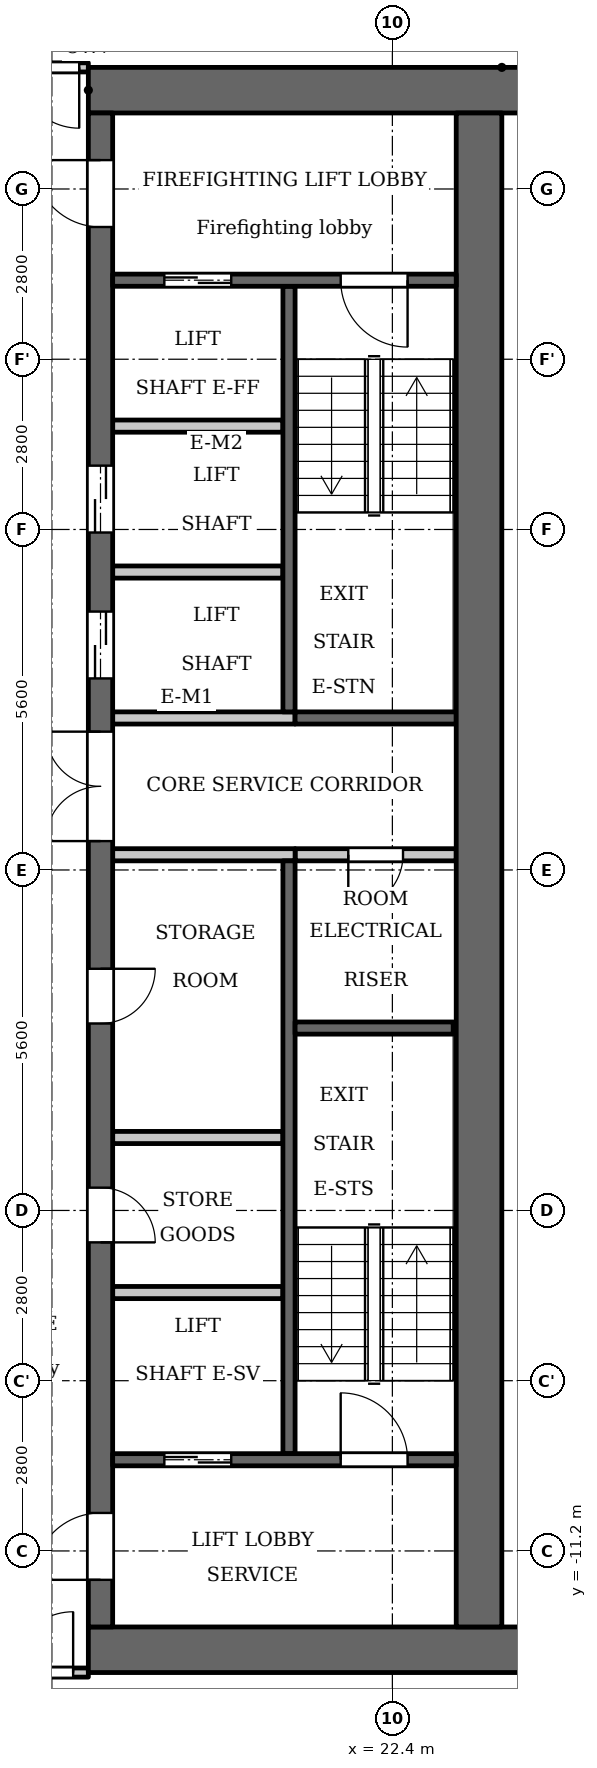
"""IFC4 building model, lengths in metres.
Left out: names, types, materials, properties, quantities, classifications, styles, units other than length and angle.
Written with IfcOpenShell. Run it as: python <this file> out.ifc"""

import sys

from ifc_helpers import new_model, si_unit, direction, frame, frame_2d, origin, place, context, subcontext, project, spatial, rectangle, extrude, element, fill, save


model = new_model("IFC4")
c1 = context("Model", 3, precision=1e-05, world=origin(), true_north=direction((0.0, 1.0)))
c2 = subcontext(c1, "Body", "Model", "MODEL_VIEW")
j1 = project(units=[si_unit("LENGTHUNIT", "METRE"), si_unit("PLANEANGLEUNIT", "RADIAN")], contexts=[c1])
p1 = place(None, origin())
s1 = spatial("IfcSite", under=j1, at=p1, CompositionType="ELEMENT")
p2 = place(p1, origin())
s2 = spatial("IfcBuilding", under=s1, at=p2, CompositionType="ELEMENT")
p3 = place(p2, frame((0.0, 0.0, 192.4)))
s3 = spatial("IfcBuildingStorey", under=s2, at=p3, CompositionType="ELEMENT", Elevation=192.4)
p4 = place(p3, frame((20.7, 2.6, 0.0), z_axis=(0.0, 0.0, 1.0), x_axis=(0.0, 1.0, 0.0)))
e1 = element("IfcWall", 1, at=p4, inside=s3, PredefinedType="SHEAR", context=c2, shape_type="SweptSolid", body=[
    extrude(rectangle(XDim=7.0, YDim=0.2, at=frame_2d((3.5, 0.0))), origin(), (0.0, 0.0, 1.0), 3.2),
])
p5 = place(p3, frame((20.7, -9.6, 0.0), z_axis=(0.0, 0.0, 1.0), x_axis=(0.0, 1.0, 0.0)))
e2 = element("IfcWall", 2, at=p5, inside=s3, PredefinedType="SHEAR", context=c2, shape_type="SweptSolid", body=[
    extrude(rectangle(XDim=9.75, YDim=0.2, at=frame_2d((4.875, 0.0))), origin(), (0.0, 0.0, 1.0), 3.2),
])
p6 = place(p3, frame((20.8, 2.5, 0.0), z_axis=(0.0, 0.0, 1.0), x_axis=(1.0, 0.0, 0.0)))
e3 = element("IfcWall", 3, at=p6, inside=s3, PredefinedType="SHEAR", context=c2, shape_type="SweptSolid", body=[
    extrude(rectangle(XDim=2.65, YDim=0.2, at=frame_2d((1.325, 0.0))), origin(), (0.0, 0.0, 1.0), 3.2),
])
p7 = place(p3, frame((20.8, 0.25, 0.0), z_axis=(0.0, 0.0, 1.0), x_axis=(1.0, 0.0, 0.0)))
e4 = element("IfcWall", 4, at=p7, inside=s3, PredefinedType="PARTITIONING", context=c2, shape_type="SweptSolid", body=[
    extrude(rectangle(XDim=2.65, YDim=0.2, at=frame_2d((1.325, 0.0))), origin(), (0.0, 0.0, 1.0), 3.2),
])
p8 = place(p7, frame((0.875, 0.0, 0.0)))
e5 = element("IfcOpeningElement", 5, at=p8, cuts=e4, PredefinedType="OPENING", context=c2, shape_type="SweptSolid", body=[
    extrude(rectangle(XDim=0.9, YDim=2.1, at=frame_2d((0.45, 1.05))), frame((0.0, 0.11, 0.0), z_axis=(0.0, -1.0, 0.0), x_axis=(1.0, 0.0, 0.0)), (0.0, 0.0, 1.0), 0.22),
])
for number, where, z_axis, x_axis in (
    (6, (17.4, 12.825, 0.0), (0.0, 0.0, 1.0), (1.0, 0.0, 0.0)),
    (7, (17.4, -12.825, 0.0), (0.0, 0.0, 1.0), (1.0, 0.0, 0.0)),
):
    element("IfcWall", number, at=place(p3, frame(where, z_axis=z_axis, x_axis=x_axis)), inside=s3, PredefinedType="SHEAR", context=c2, shape_type="SweptSolid", body=[
        extrude(rectangle(XDim=7.6, YDim=0.75, at=frame_2d((3.8, 0.0))), origin(), (0.0, 0.0, 1.0), 3.2),
    ])
p9 = place(p3, frame((17.8, -4.4, 0.0), z_axis=(0.0, 0.0, 1.0), x_axis=(1.0, 0.0, 0.0)))
e8 = element("IfcWall", 8, at=p9, inside=s3, PredefinedType="PARTITIONING", context=c2, shape_type="SweptSolid", body=[
    extrude(rectangle(XDim=2.8, YDim=0.2, at=frame_2d((1.4, 0.0))), origin(), (0.0, 0.0, 1.0), 3.2),
])
p10 = place(p3, frame((17.6, -12.45, 0.0), z_axis=(0.0, 0.0, 1.0), x_axis=(0.0, 1.0, 0.0)))
e9 = element("IfcWall", 9, at=p10, inside=s3, PredefinedType="SHEAR", context=c2, shape_type="SweptSolid", body=[
    extrude(rectangle(XDim=24.9, YDim=0.4, at=frame_2d((12.45, 0.0))), origin(), (0.0, 0.0, 1.0), 3.2),
])
p11 = place(p10, frame((6.325, 0.0, 0.0)))
e10 = element("IfcOpeningElement", 10, at=p11, cuts=e9, PredefinedType="OPENING", context=c2, shape_type="SweptSolid", body=[
    extrude(rectangle(XDim=0.9, YDim=2.1, at=frame_2d((0.45, 1.05))), frame((0.0, 0.21, 0.0), z_axis=(0.0, -1.0, 0.0), x_axis=(1.0, 0.0, 0.0)), (0.0, 0.0, 1.0), 0.42),
])
p12 = place(p10, frame((9.925, 0.0, 0.0)))
e11 = element("IfcOpeningElement", 11, at=p12, cuts=e9, PredefinedType="OPENING", context=c2, shape_type="SweptSolid", body=[
    extrude(rectangle(XDim=0.9, YDim=2.1, at=frame_2d((0.45, 1.05))), frame((0.0, 0.21, 0.0), z_axis=(0.0, -1.0, 0.0), x_axis=(1.0, 0.0, 0.0)), (0.0, 0.0, 1.0), 0.42),
])
p13 = place(p10, frame((15.6, 0.0, 0.0)))
e12 = element("IfcOpeningElement", 12, at=p13, cuts=e9, PredefinedType="OPENING", context=c2, shape_type="SweptSolid", body=[
    extrude(rectangle(XDim=1.1, YDim=2.1, at=frame_2d((0.55, 1.05))), frame((0.0, 0.21, 0.0), z_axis=(0.0, -1.0, 0.0), x_axis=(1.0, 0.0, 0.0)), (0.0, 0.0, 1.0), 0.42),
])
p14 = place(p10, frame((18.0, 0.0, 0.0)))
e13 = element("IfcOpeningElement", 13, at=p14, cuts=e9, PredefinedType="OPENING", context=c2, shape_type="SweptSolid", body=[
    extrude(rectangle(XDim=1.1, YDim=2.1, at=frame_2d((0.55, 1.05))), frame((0.0, 0.21, 0.0), z_axis=(0.0, -1.0, 0.0), x_axis=(1.0, 0.0, 0.0)), (0.0, 0.0, 1.0), 0.42),
])
p15 = place(p10, frame((23.025, 0.0, 0.0)))
e14 = element("IfcOpeningElement", 14, at=p15, cuts=e9, PredefinedType="OPENING", context=c2, shape_type="SweptSolid", body=[
    extrude(rectangle(XDim=1.1, YDim=2.1, at=frame_2d((0.55, 1.05))), frame((0.0, 0.21, 0.0), z_axis=(0.0, -1.0, 0.0), x_axis=(1.0, 0.0, 0.0)), (0.0, 0.0, 1.0), 0.42),
])
p16 = place(p10, frame((0.775, 0.0, 0.0)))
e15 = element("IfcOpeningElement", 15, at=p16, cuts=e9, PredefinedType="OPENING", context=c2, shape_type="SweptSolid", body=[
    extrude(rectangle(XDim=1.1, YDim=2.1, at=frame_2d((0.55, 1.05))), frame((0.0, 0.21, 0.0), z_axis=(0.0, -1.0, 0.0), x_axis=(1.0, 0.0, 0.0)), (0.0, 0.0, 1.0), 0.42),
])
p17 = place(p10, frame((12.925, 0.0, 0.0)))
e16 = element("IfcOpeningElement", 16, at=p17, cuts=e9, PredefinedType="OPENING", context=c2, shape_type="SweptSolid", body=[
    extrude(rectangle(XDim=1.8, YDim=2.1, at=frame_2d((0.9, 1.05))), frame((0.0, 0.21, 0.0), z_axis=(0.0, -1.0, 0.0), x_axis=(1.0, 0.0, 0.0)), (0.0, 0.0, 1.0), 0.42),
])
p18 = place(p3, frame((23.825, -12.45, 0.0), z_axis=(0.0, 0.0, 1.0), x_axis=(0.0, 1.0, 0.0)))
e17 = element("IfcWall", 17, at=p18, inside=s3, PredefinedType="SHEAR", context=c2, shape_type="SweptSolid", body=[
    extrude(rectangle(XDim=24.9, YDim=0.75, at=frame_2d((12.45, 0.0))), origin(), (0.0, 0.0, 1.0), 3.2),
])
p19 = place(p3, frame((17.8, -9.7, 0.0), z_axis=(0.0, 0.0, 1.0), x_axis=(1.0, 0.0, 0.0)))
e18 = element("IfcWall", 18, at=p19, inside=s3, PredefinedType="SHEAR", context=c2, shape_type="SweptSolid", body=[
    extrude(rectangle(XDim=5.65, YDim=0.2, at=frame_2d((2.825, 0.0))), origin(), (0.0, 0.0, 1.0), 3.2),
])
p20 = place(p19, frame((0.85, 0.0, 0.0)))
e19 = element("IfcOpeningElement", 19, at=p20, cuts=e18, PredefinedType="OPENING", context=c2, shape_type="SweptSolid", body=[
    extrude(rectangle(XDim=1.1, YDim=2.1, at=frame_2d((0.55, 1.05))), frame((0.0, 0.11, 0.0), z_axis=(0.0, -1.0, 0.0), x_axis=(1.0, 0.0, 0.0)), (0.0, 0.0, 1.0), 0.22),
])
p21 = place(p19, frame((3.75, 0.0, 0.0)))
e20 = element("IfcOpeningElement", 20, at=p21, cuts=e18, PredefinedType="OPENING", context=c2, shape_type="SweptSolid", body=[
    extrude(rectangle(XDim=1.1, YDim=2.1, at=frame_2d((0.55, 1.05))), frame((0.0, 0.11, 0.0), z_axis=(0.0, -1.0, 0.0), x_axis=(1.0, 0.0, 0.0)), (0.0, 0.0, 1.0), 0.22),
])
p22 = place(p3, frame((17.8, -6.95, 0.0), z_axis=(0.0, 0.0, 1.0), x_axis=(1.0, 0.0, 0.0)))
e21 = element("IfcWall", 21, at=p22, inside=s3, PredefinedType="PARTITIONING", context=c2, shape_type="SweptSolid", body=[
    extrude(rectangle(XDim=2.8, YDim=0.2, at=frame_2d((1.4, 0.0))), origin(), (0.0, 0.0, 1.0), 3.2),
])
for number, where, z_axis, x_axis in (
    (22, (17.8, 0.25, 0.0), (0.0, 0.0, 1.0), (1.0, 0.0, 0.0)),
    (23, (17.8, 2.5, 0.0), (0.0, 0.0, 1.0), (1.0, 0.0, 0.0)),
):
    element("IfcWall", number, at=place(p3, frame(where, z_axis=z_axis, x_axis=x_axis)), inside=s3, PredefinedType="PARTITIONING", context=c2, shape_type="SweptSolid", body=[
        extrude(rectangle(XDim=3.0, YDim=0.2, at=frame_2d((1.5, 0.0))), origin(), (0.0, 0.0, 1.0), 3.2),
    ])
for number, where, z_axis, x_axis in (
    (24, (17.8, 4.9, 0.0), (0.0, 0.0, 1.0), (1.0, 0.0, 0.0)),
    (25, (17.8, 7.3, 0.0), (0.0, 0.0, 1.0), (1.0, 0.0, 0.0)),
):
    element("IfcWall", number, at=place(p3, frame(where, z_axis=z_axis, x_axis=x_axis)), inside=s3, PredefinedType="PARTITIONING", context=c2, shape_type="SweptSolid", body=[
        extrude(rectangle(XDim=2.8, YDim=0.2, at=frame_2d((1.4, 0.0))), origin(), (0.0, 0.0, 1.0), 3.2),
    ])
p23 = place(p3, frame((17.8, 9.7, 0.0), z_axis=(0.0, 0.0, 1.0), x_axis=(1.0, 0.0, 0.0)))
e26 = element("IfcWall", 26, at=p23, inside=s3, PredefinedType="SHEAR", context=c2, shape_type="SweptSolid", body=[
    extrude(rectangle(XDim=5.65, YDim=0.2, at=frame_2d((2.825, 0.0))), origin(), (0.0, 0.0, 1.0), 3.2),
])
p24 = place(p23, frame((0.85, 0.0, 0.0)))
e27 = element("IfcOpeningElement", 27, at=p24, cuts=e26, PredefinedType="OPENING", context=c2, shape_type="SweptSolid", body=[
    extrude(rectangle(XDim=1.1, YDim=2.1, at=frame_2d((0.55, 1.05))), frame((0.0, 0.11, 0.0), z_axis=(0.0, -1.0, 0.0), x_axis=(1.0, 0.0, 0.0)), (0.0, 0.0, 1.0), 0.22),
])
p25 = place(p23, frame((3.75, 0.0, 0.0)))
e28 = element("IfcOpeningElement", 28, at=p25, cuts=e26, PredefinedType="OPENING", context=c2, shape_type="SweptSolid", body=[
    extrude(rectangle(XDim=1.1, YDim=2.1, at=frame_2d((0.55, 1.05))), frame((0.0, 0.11, 0.0), z_axis=(0.0, -1.0, 0.0), x_axis=(1.0, 0.0, 0.0)), (0.0, 0.0, 1.0), 0.22),
])
p26 = place(p3, frame((20.8, -2.6, 0.0), z_axis=(0.0, 0.0, 1.0), x_axis=(1.0, 0.0, 0.0)))
e29 = element("IfcWall", 29, at=p26, inside=s3, PredefinedType="SHEAR", context=c2, shape_type="SweptSolid", body=[
    extrude(rectangle(XDim=2.6, YDim=0.2, at=frame_2d((1.3, 0.0))), origin(), (0.0, 0.0, 1.0), 3.2),
])
p27 = place(p3, frame((-17.4, -13.2, 0.0), z_axis=(0.0, 0.0, 1.0), x_axis=(1.0, 0.0, 0.0)))
e30 = element("IfcWall", 30, at=p27, inside=s3, PredefinedType="PARTITIONING", context=c2, shape_type="SweptSolid", body=[
    extrude(rectangle(XDim=34.8, YDim=0.15, at=frame_2d((17.4, 0.0))), origin(), (0.0, 0.0, 1.0), 3.2),
])
p28 = place(p27, frame((0.15, 0.0, 0.0)))
e31 = element("IfcOpeningElement", 31, at=p28, cuts=e30, PredefinedType="OPENING", context=c2, shape_type="SweptSolid", body=[
    extrude(rectangle(XDim=1.0, YDim=2.1, at=frame_2d((0.5, 1.05))), frame((0.0, 0.085, 0.0), z_axis=(0.0, -1.0, 0.0), x_axis=(1.0, 0.0, 0.0)), (0.0, 0.0, 1.0), 0.17),
])
p29 = place(p27, frame((33.55, 0.0, 0.0)))
e32 = element("IfcOpeningElement", 32, at=p29, cuts=e30, PredefinedType="OPENING", context=c2, shape_type="SweptSolid", body=[
    extrude(rectangle(XDim=1.0, YDim=2.1, at=frame_2d((0.5, 1.05))), frame((0.0, 0.085, 0.0), z_axis=(0.0, -1.0, 0.0), x_axis=(1.0, 0.0, 0.0)), (0.0, 0.0, 1.0), 0.17),
])
p30 = place(p27, frame((15.7, 0.0, 0.0)))
e33 = element("IfcOpeningElement", 33, at=p30, cuts=e30, PredefinedType="OPENING", context=c2, shape_type="SweptSolid", body=[
    extrude(rectangle(XDim=1.0, YDim=2.1, at=frame_2d((0.5, 1.05))), frame((0.0, 0.085, 0.0), z_axis=(0.0, -1.0, 0.0), x_axis=(1.0, 0.0, 0.0)), (0.0, 0.0, 1.0), 0.17),
])
p31 = place(p27, frame((26.9, 0.0, 0.0)))
e34 = element("IfcOpeningElement", 34, at=p31, cuts=e30, PredefinedType="OPENING", context=c2, shape_type="SweptSolid", body=[
    extrude(rectangle(XDim=1.0, YDim=2.1, at=frame_2d((0.5, 1.05))), frame((0.0, 0.085, 0.0), z_axis=(0.0, -1.0, 0.0), x_axis=(1.0, 0.0, 0.0)), (0.0, 0.0, 1.0), 0.17),
])
p32 = place(p3, frame((-17.4, 13.2, 0.0), z_axis=(0.0, 0.0, 1.0), x_axis=(1.0, 0.0, 0.0)))
e35 = element("IfcWall", 35, at=p32, inside=s3, PredefinedType="PARTITIONING", context=c2, shape_type="SweptSolid", body=[
    extrude(rectangle(XDim=34.8, YDim=0.15, at=frame_2d((17.4, 0.0))), origin(), (0.0, 0.0, 1.0), 3.2),
])
p33 = place(p32, frame((0.25, 0.0, 0.0)))
e36 = element("IfcOpeningElement", 36, at=p33, cuts=e35, PredefinedType="OPENING", context=c2, shape_type="SweptSolid", body=[
    extrude(rectangle(XDim=1.0, YDim=2.1, at=frame_2d((0.5, 1.05))), frame((0.0, 0.085, 0.0), z_axis=(0.0, -1.0, 0.0), x_axis=(1.0, 0.0, 0.0)), (0.0, 0.0, 1.0), 0.17),
])
p34 = place(p32, frame((33.65, 0.0, 0.0)))
e37 = element("IfcOpeningElement", 37, at=p34, cuts=e35, PredefinedType="OPENING", context=c2, shape_type="SweptSolid", body=[
    extrude(rectangle(XDim=1.0, YDim=2.1, at=frame_2d((0.5, 1.05))), frame((0.0, 0.085, 0.0), z_axis=(0.0, -1.0, 0.0), x_axis=(1.0, 0.0, 0.0)), (0.0, 0.0, 1.0), 0.17),
])
p35 = place(p32, frame((10.15, 0.0, 0.0)))
e38 = element("IfcOpeningElement", 38, at=p35, cuts=e35, PredefinedType="OPENING", context=c2, shape_type="SweptSolid", body=[
    extrude(rectangle(XDim=1.0, YDim=2.1, at=frame_2d((0.5, 1.05))), frame((0.0, 0.085, 0.0), z_axis=(0.0, -1.0, 0.0), x_axis=(1.0, 0.0, 0.0)), (0.0, 0.0, 1.0), 0.17),
])
p36 = place(p32, frame((13.55, 0.0, 0.0)))
e39 = element("IfcOpeningElement", 39, at=p36, cuts=e35, PredefinedType="OPENING", context=c2, shape_type="SweptSolid", body=[
    extrude(rectangle(XDim=1.0, YDim=2.1, at=frame_2d((0.5, 1.05))), frame((0.0, 0.085, 0.0), z_axis=(0.0, -1.0, 0.0), x_axis=(1.0, 0.0, 0.0)), (0.0, 0.0, 1.0), 0.17),
])
p37 = place(p32, frame((20.85, 0.0, 0.0)))
e40 = element("IfcOpeningElement", 40, at=p37, cuts=e35, PredefinedType="OPENING", context=c2, shape_type="SweptSolid", body=[
    extrude(rectangle(XDim=1.0, YDim=2.1, at=frame_2d((0.5, 1.05))), frame((0.0, 0.085, 0.0), z_axis=(0.0, -1.0, 0.0), x_axis=(1.0, 0.0, 0.0)), (0.0, 0.0, 1.0), 0.17),
])
p38 = place(p32, frame((23.7, 0.0, 0.0)))
e41 = element("IfcOpeningElement", 41, at=p38, cuts=e35, PredefinedType="OPENING", context=c2, shape_type="SweptSolid", body=[
    extrude(rectangle(XDim=1.0, YDim=2.1, at=frame_2d((0.5, 1.05))), frame((0.0, 0.085, 0.0), z_axis=(0.0, -1.0, 0.0), x_axis=(1.0, 0.0, 0.0)), (0.0, 0.0, 1.0), 0.17),
])
p39 = place(p20, origin())
e42 = element("IfcDoor", 42, at=p39, inside=s3, OperationType="DOUBLE_DOOR_SLIDING", PredefinedType="DOOR", context=c2, shape_type="SweptSolid", body=[
    extrude(rectangle(XDim=1.1, YDim=2.1, at=frame_2d((0.55, 1.05))), frame((0.0, 0.025, 0.0), z_axis=(0.0, -1.0, 0.0), x_axis=(1.0, 0.0, 0.0)), (0.0, 0.0, 1.0), 0.05),
])
fill(e19, e42)
p40 = place(p11, origin())
e43 = element("IfcDoor", 43, at=p40, inside=s3, OperationType="SINGLE_SWING_LEFT", PredefinedType="DOOR", context=c2, shape_type="SweptSolid", body=[
    extrude(rectangle(XDim=0.9, YDim=2.1, at=frame_2d((0.45, 1.05))), frame((0.0, 0.025, 0.0), z_axis=(0.0, -1.0, 0.0), x_axis=(1.0, 0.0, 0.0)), (0.0, 0.0, 1.0), 0.05),
])
fill(e10, e43)
p41 = place(p12, origin())
e44 = element("IfcDoor", 44, at=p41, inside=s3, OperationType="SINGLE_SWING_RIGHT", PredefinedType="DOOR", context=c2, shape_type="SweptSolid", body=[
    extrude(rectangle(XDim=0.9, YDim=2.1, at=frame_2d((0.45, 1.05))), frame((0.0, 0.025, 0.0), z_axis=(0.0, -1.0, 0.0), x_axis=(1.0, 0.0, 0.0)), (0.0, 0.0, 1.0), 0.05),
])
fill(e11, e44)
p42 = place(p13, origin())
e45 = element("IfcDoor", 45, at=p42, inside=s3, OperationType="DOUBLE_DOOR_SLIDING", PredefinedType="DOOR", context=c2, shape_type="SweptSolid", body=[
    extrude(rectangle(XDim=1.1, YDim=2.1, at=frame_2d((0.55, 1.05))), frame((0.0, 0.025, 0.0), z_axis=(0.0, -1.0, 0.0), x_axis=(1.0, 0.0, 0.0)), (0.0, 0.0, 1.0), 0.05),
])
fill(e12, e45)
p43 = place(p14, origin())
e46 = element("IfcDoor", 46, at=p43, inside=s3, OperationType="DOUBLE_DOOR_SLIDING", PredefinedType="DOOR", context=c2, shape_type="SweptSolid", body=[
    extrude(rectangle(XDim=1.1, YDim=2.1, at=frame_2d((0.55, 1.05))), frame((0.0, 0.025, 0.0), z_axis=(0.0, -1.0, 0.0), x_axis=(1.0, 0.0, 0.0)), (0.0, 0.0, 1.0), 0.05),
])
fill(e13, e46)
p44 = place(p24, origin())
e47 = element("IfcDoor", 47, at=p44, inside=s3, OperationType="DOUBLE_DOOR_SLIDING", PredefinedType="DOOR", context=c2, shape_type="SweptSolid", body=[
    extrude(rectangle(XDim=1.1, YDim=2.1, at=frame_2d((0.55, 1.05))), frame((0.0, 0.025, 0.0), z_axis=(0.0, -1.0, 0.0), x_axis=(1.0, 0.0, 0.0)), (0.0, 0.0, 1.0), 0.05),
])
fill(e27, e47)
p45 = place(p15, origin())
e48 = element("IfcDoor", 48, at=p45, inside=s3, OperationType="SINGLE_SWING_LEFT", PredefinedType="DOOR", context=c2, shape_type="SweptSolid", body=[
    extrude(rectangle(XDim=1.1, YDim=2.1, at=frame_2d((0.55, 1.05))), frame((0.0, 0.025, 0.0), z_axis=(0.0, -1.0, 0.0), x_axis=(1.0, 0.0, 0.0)), (0.0, 0.0, 1.0), 0.05),
])
fill(e14, e48)
p46 = place(p16, origin())
e49 = element("IfcDoor", 49, at=p46, inside=s3, OperationType="SINGLE_SWING_RIGHT", PredefinedType="DOOR", context=c2, shape_type="SweptSolid", body=[
    extrude(rectangle(XDim=1.1, YDim=2.1, at=frame_2d((0.55, 1.05))), frame((0.0, 0.025, 0.0), z_axis=(0.0, -1.0, 0.0), x_axis=(1.0, 0.0, 0.0)), (0.0, 0.0, 1.0), 0.05),
])
fill(e15, e49)
p47 = place(p25, origin())
e50 = element("IfcDoor", 50, at=p47, inside=s3, OperationType="SINGLE_SWING_RIGHT", PredefinedType="DOOR", context=c2, shape_type="SweptSolid", body=[
    extrude(rectangle(XDim=1.1, YDim=2.1, at=frame_2d((0.55, 1.05))), frame((0.0, 0.025, 0.0), z_axis=(0.0, -1.0, 0.0), x_axis=(1.0, 0.0, 0.0)), (0.0, 0.0, 1.0), 0.05),
])
fill(e28, e50)
p48 = place(p21, origin())
e51 = element("IfcDoor", 51, at=p48, inside=s3, OperationType="SINGLE_SWING_RIGHT", PredefinedType="DOOR", context=c2, shape_type="SweptSolid", body=[
    extrude(rectangle(XDim=1.1, YDim=2.1, at=frame_2d((0.55, 1.05))), frame((0.0, 0.025, 0.0), z_axis=(0.0, -1.0, 0.0), x_axis=(1.0, 0.0, 0.0)), (0.0, 0.0, 1.0), 0.05),
])
fill(e20, e51)
p49 = place(p17, origin())
e52 = element("IfcDoor", 52, at=p49, inside=s3, OperationType="DOUBLE_DOOR_SINGLE_SWING", PredefinedType="DOOR", context=c2, shape_type="SweptSolid", body=[
    extrude(rectangle(XDim=1.8, YDim=2.1, at=frame_2d((0.9, 1.05))), frame((0.0, 0.025, 0.0), z_axis=(0.0, -1.0, 0.0), x_axis=(1.0, 0.0, 0.0)), (0.0, 0.0, 1.0), 0.05),
])
fill(e16, e52)
p50 = place(p8, origin())
e53 = element("IfcDoor", 53, at=p50, inside=s3, OperationType="SINGLE_SWING_LEFT", PredefinedType="DOOR", context=c2, shape_type="SweptSolid", body=[
    extrude(rectangle(XDim=0.9, YDim=2.1, at=frame_2d((0.45, 1.05))), frame((0.0, 0.025, 0.0), z_axis=(0.0, -1.0, 0.0), x_axis=(1.0, 0.0, 0.0)), (0.0, 0.0, 1.0), 0.05),
])
fill(e5, e53)
p51 = place(p34, origin())
e54 = element("IfcDoor", 54, at=p51, inside=s3, OperationType="SINGLE_SWING_RIGHT", PredefinedType="DOOR", context=c2, shape_type="SweptSolid", body=[
    extrude(rectangle(XDim=1.0, YDim=2.1, at=frame_2d((0.5, 1.05))), frame((0.0, 0.025, 0.0), z_axis=(0.0, -1.0, 0.0), x_axis=(1.0, 0.0, 0.0)), (0.0, 0.0, 1.0), 0.05),
])
fill(e37, e54)
p52 = place(p29, origin())
e55 = element("IfcDoor", 55, at=p52, inside=s3, OperationType="SINGLE_SWING_LEFT", PredefinedType="DOOR", context=c2, shape_type="SweptSolid", body=[
    extrude(rectangle(XDim=1.0, YDim=2.1, at=frame_2d((0.5, 1.05))), frame((0.0, 0.025, 0.0), z_axis=(0.0, -1.0, 0.0), x_axis=(1.0, 0.0, 0.0)), (0.0, 0.0, 1.0), 0.05),
])
fill(e32, e55)
save(model, sys.argv[1])
